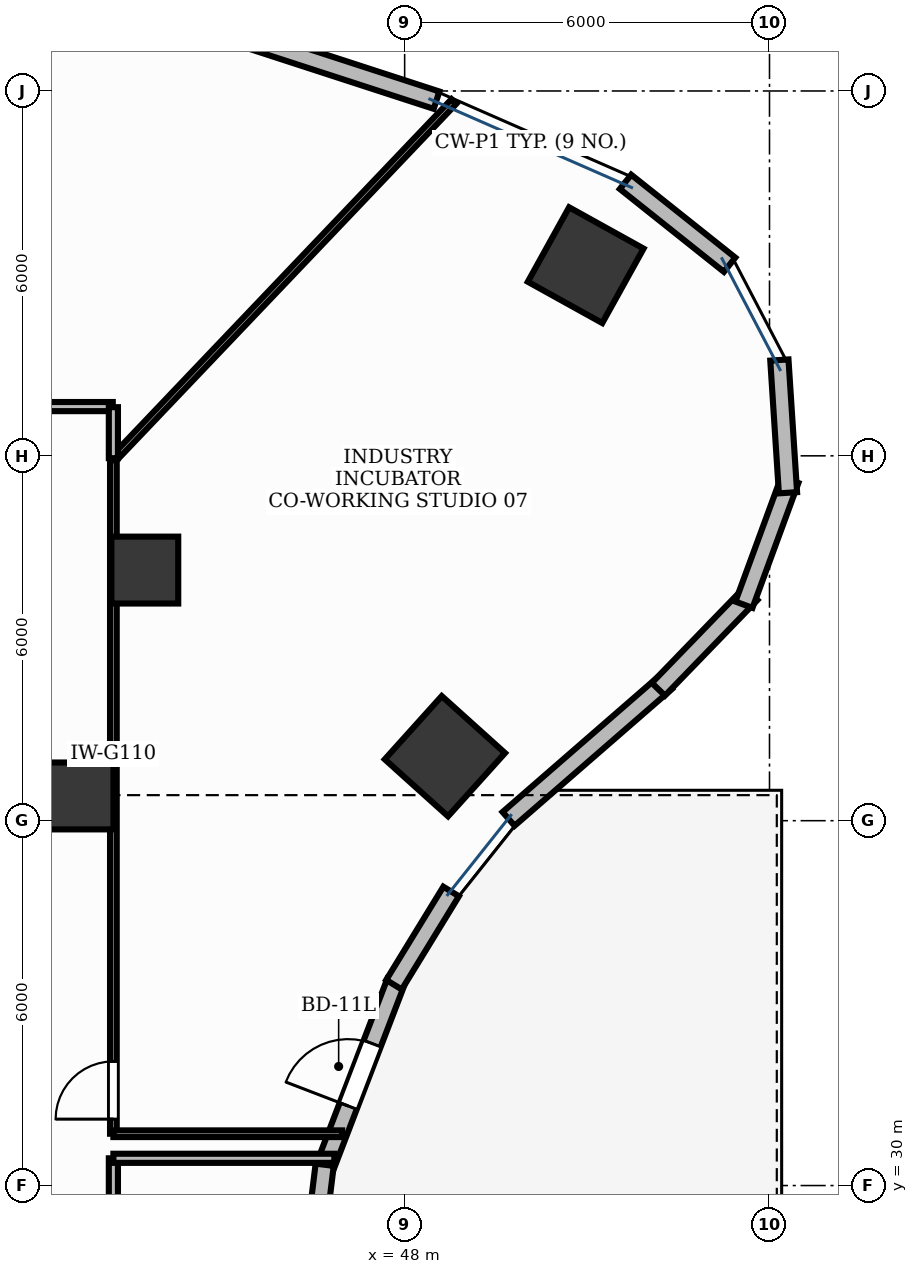
"""IFC4 building model, lengths in metres.
Left out: names, types, materials, properties, quantities, classifications, styles, units other than length and angle.
Written with IfcOpenShell. Run it as: python <this file> out.ifc"""

import sys

from ifc_helpers import new_model, si_unit, direction, frame, frame_2d, origin, origin_2d, place, context, subcontext, project, spatial, rectangle, extrude, element, fill, save


model = new_model("IFC4")
c1 = context("Model", 3, precision=1e-05, world=origin(), true_north=direction((0.0, 1.0)))
c2 = subcontext(c1, "Body", "Model", "MODEL_VIEW")
j1 = project(units=[si_unit("LENGTHUNIT", "METRE"), si_unit("PLANEANGLEUNIT", "RADIAN")], contexts=[c1])
p1 = place(None, origin())
s1 = spatial("IfcSite", under=j1, at=p1, CompositionType="ELEMENT")
p2 = place(p1, origin())
s2 = spatial("IfcBuilding", under=s1, at=p2, CompositionType="ELEMENT")
p3 = place(p2, frame((0.0, 0.0, 20.4)))
s3 = spatial("IfcBuildingStorey", under=s2, at=p3, CompositionType="ELEMENT", Elevation=20.4)
p4 = place(p3, frame((50.977, 45.135, -0.0), z_axis=(0.0, 0.0, 1.0), x_axis=(-0.874535078577, 0.484962262797, 0.0)))
e1 = element("IfcColumn", 1, at=p4, inside=s3, PredefinedType="COLUMN", context=c2, shape_type="SweptSolid", body=[
    extrude(rectangle(XDim=1.4, YDim=1.4, at=origin_2d()), origin(), (0.0, 0.0, 1.0), 5.101),
])
p5 = place(p3, frame((43.727, 40.121, -0.0), z_axis=(0.0, 0.0, 1.0), x_axis=(1.0, 0.0, 0.0)))
e2 = element("IfcColumn", 2, at=p5, inside=s3, PredefinedType="COLUMN", context=c2, shape_type="SweptSolid", body=[
    extrude(rectangle(XDim=1.1, YDim=1.1, at=origin_2d()), origin(), (0.0, 0.0, 1.0), 5.101),
])
p6 = place(p3, frame((48.662, 37.061, -0.0), z_axis=(0.0, 0.0, 1.0), x_axis=(0.669130606359, 0.743144825477, 0.0)))
e3 = element("IfcColumn", 3, at=p6, inside=s3, PredefinedType="COLUMN", context=c2, shape_type="SweptSolid", body=[
    extrude(rectangle(XDim=1.4, YDim=1.4, at=origin_2d()), origin(), (0.0, 0.0, 1.0), 5.101),
])
p7 = place(p3, frame((42.662, 36.407, -0.0), z_axis=(0.0, 0.0, 1.0), x_axis=(1.0, 0.0, 0.0)))
e4 = element("IfcColumn", 4, at=p7, inside=s3, PredefinedType="COLUMN", context=c2, shape_type="SweptSolid", body=[
    extrude(rectangle(XDim=1.1, YDim=1.1, at=origin_2d()), origin(), (0.0, 0.0, 1.0), 5.101),
])
p8 = place(p3, frame((46.684, 30.295, 0.0), z_axis=(0.0, 0.0, 1.0), x_axis=(0.358338531341, 0.933591718556, 0.0)))
e5 = element("IfcWall", 5, at=p8, inside=s3, PredefinedType="STANDARD", context=c2, shape_type="SweptSolid", body=[
    extrude(rectangle(XDim=3.27, YDim=0.3, at=frame_2d((1.635, 0.0))), origin(), (0.0, 0.0, 1.0), 5.1),
])
p9 = place(p8, frame((1.085, 0.0, 0.0)))
e6 = element("IfcOpeningElement", 6, at=p9, cuts=e5, PredefinedType="OPENING", context=c2, shape_type="SweptSolid", body=[
    extrude(rectangle(XDim=1.1, YDim=2.15, at=frame_2d((0.55, 1.075))), frame((0.0, 0.165, 0.0), z_axis=(0.0, -1.0, 0.0), x_axis=(1.0, 0.0, 0.0)), (0.0, 0.0, 1.0), 0.33),
])
p10 = place(p3, frame((48.525, 47.849, 0.0), z_axis=(0.0, 0.0, 1.0), x_axis=(-0.950965833732, 0.309295947393, 0.0)))
e7 = element("IfcWall", 7, at=p10, inside=s3, PredefinedType="STANDARD", context=c2, shape_type="SweptSolid", body=[
    extrude(rectangle(XDim=3.84, YDim=0.3, at=frame_2d((1.92, 0.0))), origin(), (0.0, 0.0, 1.0), 5.1),
])
p11 = place(p3, frame((46.267, 26.938, 0.0), z_axis=(0.0, 0.0, 1.0), x_axis=(0.121870386032, 0.992546023622, 0.0)))
e8 = element("IfcWall", 8, at=p11, inside=s3, PredefinedType="STANDARD", context=c2, shape_type="SweptSolid", body=[
    extrude(rectangle(XDim=3.43, YDim=0.3, at=frame_2d((1.715, 0.0))), origin(), (0.0, 0.0, 1.0), 5.1),
])
p12 = place(p3, frame((47.825, 33.303, 0.0), z_axis=(0.0, 0.0, 1.0), x_axis=(0.522520662875, 0.852626622191, 0.0)))
e9 = element("IfcWall", 9, at=p12, inside=s3, PredefinedType="STANDARD", context=c2, shape_type="SweptSolid", body=[
    extrude(rectangle(XDim=1.798, YDim=0.3, at=frame_2d((0.899, 0.0))), origin(), (0.0, 0.0, 1.0), 5.1),
])
p13 = place(p3, frame((49.709, 36.029, 0.0), z_axis=(0.0, 0.0, 1.0), x_axis=(0.754746490246, 0.656016566454, 0.0)))
e10 = element("IfcWall", 10, at=p13, inside=s3, PredefinedType="STANDARD", context=c2, shape_type="SweptSolid", body=[
    extrude(rectangle(XDim=3.43, YDim=0.3, at=frame_2d((1.715, 0.0))), origin(), (0.0, 0.0, 1.0), 5.1),
])
p14 = place(p3, frame((52.173, 38.161, 0.0), z_axis=(0.0, 0.0, 1.0), x_axis=(0.695404695719, 0.718618333451, 0.0)))
e11 = element("IfcWall", 11, at=p14, inside=s3, PredefinedType="STANDARD", context=c2, shape_type="SweptSolid", body=[
    extrude(rectangle(XDim=2.188, YDim=0.3, at=frame_2d((1.094, 0.0))), origin(), (0.0, 0.0, 1.0), 5.1),
])
for number, where, z_axis, x_axis in (
    (12, (53.58, 39.552, 0.0), (0.0, 0.0, 1.0), (0.345, 0.939, 0.0)),
    (13, (54.304, 41.393, 0.0), (0.0, 0.0, 1.0), (-0.065, 0.998, 0.0)),
    (14, (53.344, 45.143, 0.0), (0.0, 0.0, 1.0), (-0.782, 0.623, 0.0)),
):
    element("IfcWall", number, at=place(p3, frame(where, z_axis=z_axis, x_axis=x_axis)), inside=s3, PredefinedType="STANDARD", context=c2, shape_type="SweptSolid", body=[
        extrude(rectangle(XDim=2.188, YDim=0.3, at=frame_2d((1.094, 0.0))), origin(), (0.0, 0.0, 1.0), 5.1),
    ])
p15 = place(p3, frame((43.21, 14.658, 0.0), z_axis=(0.0, 0.0, 1.0), x_axis=(0.0, 1.0, 0.0)))
e15 = element("IfcWall", 15, at=p15, inside=s3, PredefinedType="PARTITIONING", context=c2, shape_type="SweptSolid", body=[
    extrude(rectangle(XDim=15.79, YDim=0.15, at=frame_2d((7.895, 0.0))), origin(), (0.0, 0.0, 1.0), 4.11),
])
p16 = place(p15, frame((6.472, 0.0, 0.0)))
e16 = element("IfcOpeningElement", 16, at=p16, cuts=e15, PredefinedType="OPENING", context=c2, shape_type="SweptSolid", body=[
    extrude(rectangle(XDim=0.95, YDim=2.15, at=frame_2d((0.475, 1.075))), frame((0.0, 0.09, 0.0), z_axis=(0.0, -1.0, 0.0), x_axis=(1.0, 0.0, 0.0)), (0.0, 0.0, 1.0), 0.18),
])
p17 = place(p3, frame((43.21, 30.852, 0.0), z_axis=(0.0, 0.0, 1.0), x_axis=(0.0, 1.0, 0.0)))
e17 = element("IfcWall", 17, at=p17, inside=s3, PredefinedType="MOVABLE", context=c2, shape_type="SweptSolid", body=[
    extrude(rectangle(XDim=11.095, YDim=0.11, at=frame_2d((5.547, 0.0))), origin(), (0.0, 0.0, 1.0), 4.11),
])
p18 = place(p17, frame((0.24, 0.0, 0.0)))
e18 = element("IfcOpeningElement", 18, at=p18, cuts=e17, PredefinedType="OPENING", context=c2, shape_type="SweptSolid", body=[
    extrude(rectangle(XDim=0.95, YDim=2.15, at=frame_2d((0.475, 1.075))), frame((0.0, 0.07, 0.0), z_axis=(0.0, -1.0, 0.0), x_axis=(1.0, 0.0, 0.0)), (0.0, 0.0, 1.0), 0.14),
])
p19 = place(p3, frame((43.2, 42.81, 0.0), z_axis=(0.0, 0.0, 1.0), x_axis=(-1.0, 0.0, 0.0)))
e19 = element("IfcWall", 19, at=p19, inside=s3, PredefinedType="PARTITIONING", context=c2, shape_type="SweptSolid", body=[
    extrude(rectangle(XDim=9.498, YDim=0.15, at=frame_2d((4.749, 0.0))), origin(), (0.0, 0.0, 1.0), 4.11),
])
p20 = place(p19, frame((7.623, 0.0, 0.0)))
e20 = element("IfcOpeningElement", 20, at=p20, cuts=e19, PredefinedType="OPENING", context=c2, shape_type="SweptSolid", body=[
    extrude(rectangle(XDim=0.95, YDim=2.15, at=frame_2d((0.475, 1.075))), frame((0.0, 0.09, 0.0), z_axis=(0.0, -1.0, 0.0), x_axis=(1.0, 0.0, 0.0)), (0.0, 0.0, 1.0), 0.18),
])
p21 = place(p3, frame((43.21, 30.448, 0.0), z_axis=(0.0, 0.0, 1.0), x_axis=(1.0, 0.0, 0.0)))
e21 = element("IfcWall", 21, at=p21, inside=s3, PredefinedType="PARTITIONING", context=c2, shape_type="SweptSolid", body=[
    extrude(rectangle(XDim=3.634, YDim=0.15, at=frame_2d((1.817, 0.0))), origin(), (0.0, 0.0, 1.0), 4.11),
])
p22 = place(p3, frame((46.971, 30.852, 0.0), z_axis=(0.0, 0.0, 1.0), x_axis=(-1.0, 0.0, 0.0)))
e22 = element("IfcWall", 22, at=p22, inside=s3, PredefinedType="MOVABLE", context=c2, shape_type="SweptSolid", body=[
    extrude(rectangle(XDim=3.761, YDim=0.11, at=frame_2d((1.881, 0.0))), origin(), (0.0, 0.0, 1.0), 4.11),
])
p23 = place(p3, frame((43.21, 41.947, 0.0), z_axis=(0.0, 0.0, 1.0), x_axis=(0.689609379857, 0.724181540232, 0.0)))
e23 = element("IfcWall", 23, at=p23, inside=s3, PredefinedType="MOVABLE", context=c2, shape_type="SweptSolid", body=[
    extrude(rectangle(XDim=8.121, YDim=0.11, at=frame_2d((4.061, 0.0))), origin(), (0.0, 0.0, 1.0), 4.11),
])
p24 = place(p3, frame((43.21, 41.961, 0.0), z_axis=(0.0, 0.0, 1.0), x_axis=(0.0, 1.0, 0.0)))
e24 = element("IfcWall", 24, at=p24, inside=s3, PredefinedType="PARTITIONING", context=c2, shape_type="SweptSolid", body=[
    extrude(rectangle(XDim=0.839, YDim=0.15, at=frame_2d((0.419, 0.0))), origin(), (0.0, 0.0, 1.0), 4.11),
])
p25 = place(p9, origin())
e25 = element("IfcDoor", 25, at=p25, inside=s3, OperationType="SINGLE_SWING_LEFT", PredefinedType="DOOR", context=c2, shape_type="SweptSolid", body=[
    extrude(rectangle(XDim=1.1, YDim=2.15, at=frame_2d((0.55, 1.075))), frame((0.0, 0.025, 0.0), z_axis=(0.0, -1.0, 0.0), x_axis=(1.0, 0.0, 0.0)), (0.0, 0.0, 1.0), 0.05),
])
fill(e6, e25)
p26 = place(p18, origin())
e26 = element("IfcDoor", 26, at=p26, inside=s3, OperationType="SINGLE_SWING_LEFT", PredefinedType="DOOR", context=c2, shape_type="SweptSolid", body=[
    extrude(rectangle(XDim=0.95, YDim=2.15, at=frame_2d((0.475, 1.075))), frame((0.0, 0.025, 0.0), z_axis=(0.0, -1.0, 0.0), x_axis=(1.0, 0.0, 0.0)), (0.0, 0.0, 1.0), 0.05),
])
fill(e18, e26)
save(model, sys.argv[1])
